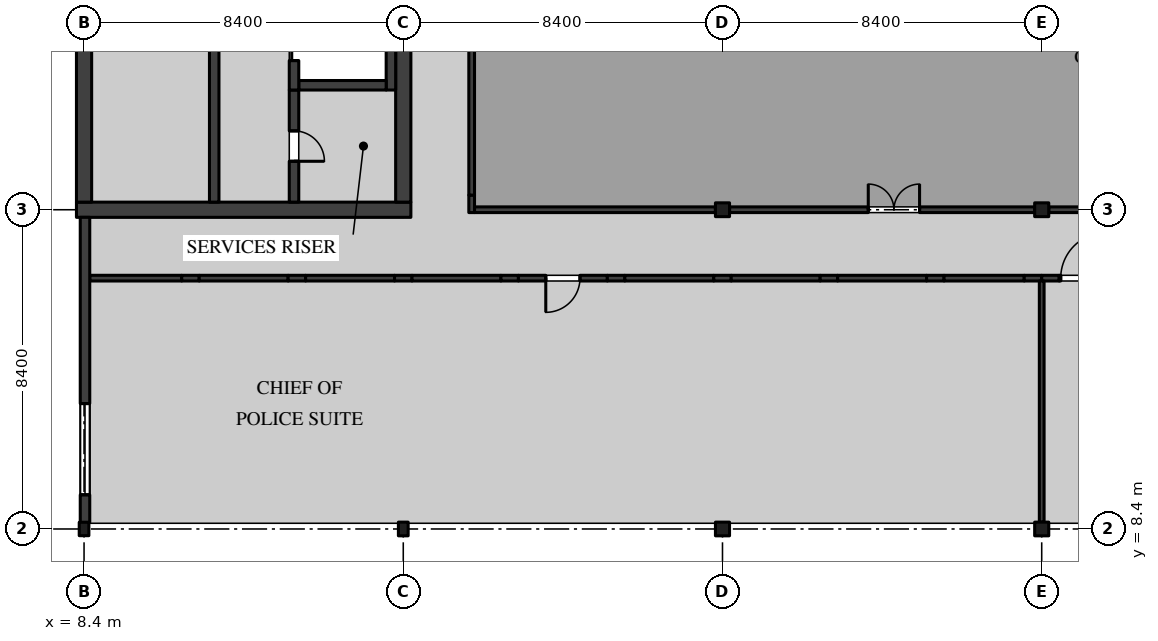
"""IFC4 building model, lengths in metres.
Left out: names, types, materials, properties, quantities, classifications, styles, units other than length and angle.
Written with IfcOpenShell. Run it as: python <this file> out.ifc"""

import sys

from ifc_helpers import new_model, si_unit, direction, frame, frame_2d, origin, origin_2d, place, context, subcontext, project, spatial, rectangle, i_section, extrude, element, fill, save


model = new_model("IFC4")
c1 = context("Model", 3, precision=1e-05, world=origin(), true_north=direction((0.0, 1.0)))
c2 = subcontext(c1, "Body", "Model", "MODEL_VIEW")
j1 = project(units=[si_unit("LENGTHUNIT", "METRE"), si_unit("PLANEANGLEUNIT", "RADIAN")], contexts=[c1])
p1 = place(None, origin())
s1 = spatial("IfcSite", under=j1, at=p1, CompositionType="ELEMENT")
p2 = place(p1, origin())
s2 = spatial("IfcBuilding", under=s1, at=p2, CompositionType="ELEMENT")
p3 = place(p2, frame((0.0, 0.0, 9.9)))
s3 = spatial("IfcBuildingStorey", under=s2, at=p3, CompositionType="ELEMENT", Elevation=9.9)
p4 = place(p3, frame((8.4, 8.4, 0.0), z_axis=(0.0, 0.0, 1.0), x_axis=(1.0, 0.0, 0.0)))
e1 = element("IfcColumn", 1, at=p4, inside=s3, PredefinedType="COLUMN", context=c2, shape_type="SweptSolid", body=[
    extrude(i_section(OverallWidth=0.254, OverallDepth=0.353, WebThickness=0.01, FlangeThickness=0.016, FilletRadius=0.015, at=origin_2d()), origin(), (0.0, 0.0, 1.0), 4.37),
])
p5 = place(p3, frame((16.8, 8.4, 0.0), z_axis=(0.0, 0.0, 1.0), x_axis=(1.0, 0.0, 0.0)))
e2 = element("IfcColumn", 2, at=p5, inside=s3, PredefinedType="COLUMN", context=c2, shape_type="SweptSolid", body=[
    extrude(i_section(OverallWidth=0.257, OverallDepth=0.361, WebThickness=0.011, FlangeThickness=0.02, FilletRadius=0.015, at=origin_2d()), origin(), (0.0, 0.0, 1.0), 4.37),
])
p6 = place(p3, frame((25.2, 8.4, 0.0), z_axis=(0.0, 0.0, 1.0), x_axis=(1.0, 0.0, 0.0)))
e3 = element("IfcColumn", 3, at=p6, inside=s3, PredefinedType="COLUMN", context=c2, shape_type="SweptSolid", body=[
    extrude(i_section(OverallWidth=0.371, OverallDepth=0.361, WebThickness=0.012, FlangeThickness=0.02, FilletRadius=0.015, at=origin_2d()), origin(), (0.0, 0.0, 1.0), 4.37),
])
p7 = place(p3, frame((25.2, 16.8, 0.0), z_axis=(0.0, 0.0, 1.0), x_axis=(1.0, 0.0, 0.0)))
e4 = element("IfcColumn", 4, at=p7, inside=s3, PredefinedType="COLUMN", context=c2, shape_type="SweptSolid", body=[
    extrude(i_section(OverallWidth=0.371, OverallDepth=0.363, WebThickness=0.013, FlangeThickness=0.022, FilletRadius=0.015, at=origin_2d()), origin(), (0.0, 0.0, 1.0), 4.37),
])
p8 = place(p3, frame((33.6, 8.4, 0.0), z_axis=(0.0, 0.0, 1.0), x_axis=(1.0, 0.0, 0.0)))
e5 = element("IfcColumn", 5, at=p8, inside=s3, PredefinedType="COLUMN", context=c2, shape_type="SweptSolid", body=[
    extrude(i_section(OverallWidth=0.371, OverallDepth=0.361, WebThickness=0.012, FlangeThickness=0.02, FilletRadius=0.015, at=origin_2d()), origin(), (0.0, 0.0, 1.0), 4.37),
])
p9 = place(p3, frame((33.6, 16.8, 0.0), z_axis=(0.0, 0.0, 1.0), x_axis=(1.0, 0.0, 0.0)))
e6 = element("IfcColumn", 6, at=p9, inside=s3, PredefinedType="COLUMN", context=c2, shape_type="SweptSolid", body=[
    extrude(i_section(OverallWidth=0.371, OverallDepth=0.363, WebThickness=0.013, FlangeThickness=0.022, FilletRadius=0.015, at=origin_2d()), origin(), (0.0, 0.0, 1.0), 4.37),
])
p10 = place(p3, frame((8.2, 16.8, 0.0), z_axis=(0.0, 0.0, 1.0), x_axis=(1.0, 0.0, 0.0)))
e7 = element("IfcWall", 7, at=p10, inside=s3, PredefinedType="SHEAR", context=c2, shape_type="SweptSolid", body=[
    extrude(rectangle(XDim=8.8, YDim=0.4, at=frame_2d((4.4, 0.0))), origin(), (0.0, 0.0, 1.0), 4.37),
])
p11 = place(p3, frame((8.4, 17.0, 0.0), z_axis=(0.0, 0.0, 1.0), x_axis=(0.0, 1.0, 0.0)))
e8 = element("IfcWall", 8, at=p11, inside=s3, PredefinedType="SHEAR", context=c2, shape_type="SweptSolid", body=[
    extrude(rectangle(XDim=8.0, YDim=0.4, at=frame_2d((4.0, 0.0))), origin(), (0.0, 0.0, 1.0), 4.37),
])
p12 = place(p3, frame((16.8, 17.0, 0.0), z_axis=(0.0, 0.0, 1.0), x_axis=(0.0, 1.0, 0.0)))
e9 = element("IfcWall", 9, at=p12, inside=s3, PredefinedType="SHEAR", context=c2, shape_type="SweptSolid", body=[
    extrude(rectangle(XDim=8.0, YDim=0.4, at=frame_2d((4.0, 0.0))), origin(), (0.0, 0.0, 1.0), 4.37),
])
p13 = place(p12, frame((6.2, 0.0, 0.0)))
e10 = element("IfcOpeningElement", 10, at=p13, cuts=e9, PredefinedType="OPENING", context=c2, shape_type="SweptSolid", body=[
    extrude(rectangle(XDim=1.2, YDim=2.1, at=frame_2d((0.6, 1.05))), frame((0.0, 0.21, 0.0), z_axis=(0.0, -1.0, 0.0), x_axis=(1.0, 0.0, 0.0)), (0.0, 0.0, 1.0), 0.42),
])
p14 = place(p3, frame((11.825, 25.0, 0.0), z_axis=(0.0, 0.0, 1.0), x_axis=(0.0, -1.0, 0.0)))
e11 = element("IfcWall", 11, at=p14, inside=s3, PredefinedType="SOLIDWALL", context=c2, shape_type="SweptSolid", body=[
    extrude(rectangle(XDim=8.0, YDim=0.25, at=frame_2d((4.0, 0.0))), origin(), (0.0, 0.0, 1.0), 4.37),
])
p15 = place(p14, frame((0.2, 0.0, 0.0)))
e12 = element("IfcOpeningElement", 12, at=p15, cuts=e11, PredefinedType="OPENING", context=c2, shape_type="SweptSolid", body=[
    extrude(rectangle(XDim=1.1, YDim=2.1, at=frame_2d((0.55, 1.05))), frame((0.0, 0.135, 0.0), z_axis=(0.0, -1.0, 0.0), x_axis=(1.0, 0.0, 0.0)), (0.0, 0.0, 1.0), 0.27),
])
p16 = place(p3, frame((13.925, 19.95, 0.0), z_axis=(0.0, 0.0, 1.0), x_axis=(0.0, -1.0, 0.0)))
e13 = element("IfcWall", 13, at=p16, inside=s3, PredefinedType="SOLIDWALL", context=c2, shape_type="SweptSolid", body=[
    extrude(rectangle(XDim=2.95, YDim=0.25, at=frame_2d((1.475, 0.0))), origin(), (0.0, 0.0, 1.0), 4.37),
])
p17 = place(p16, frame((1.075, 0.0, 0.0)))
e14 = element("IfcOpeningElement", 14, at=p17, cuts=e13, PredefinedType="OPENING", context=c2, shape_type="SweptSolid", body=[
    extrude(rectangle(XDim=0.8, YDim=2.1, at=frame_2d((0.4, 1.05))), frame((0.0, 0.135, 0.0), z_axis=(0.0, -1.0, 0.0), x_axis=(1.0, 0.0, 0.0)), (0.0, 0.0, 1.0), 0.27),
])
p18 = place(p3, frame((16.475, 19.95, 0.0), z_axis=(0.0, 0.0, 1.0), x_axis=(0.0, 1.0, 0.0)))
e15 = element("IfcWall", 15, at=p18, inside=s3, PredefinedType="SOLIDWALL", context=c2, shape_type="SweptSolid", body=[
    extrude(rectangle(XDim=2.65, YDim=0.25, at=frame_2d((1.325, 0.0))), origin(), (0.0, 0.0, 1.0), 4.37),
])
p19 = place(p3, frame((14.05, 20.075, 0.0), z_axis=(0.0, 0.0, 1.0), x_axis=(1.0, 0.0, 0.0)))
e16 = element("IfcWall", 16, at=p19, inside=s3, PredefinedType="SOLIDWALL", context=c2, shape_type="SweptSolid", body=[
    extrude(rectangle(XDim=2.3, YDim=0.25, at=frame_2d((1.15, 0.0))), origin(), (0.0, 0.0, 1.0), 4.37),
])
p20 = place(p3, frame((13.925, 19.95, 0.0), z_axis=(0.0, 0.0, 1.0), x_axis=(0.0, 1.0, 0.0)))
e17 = element("IfcWall", 17, at=p20, inside=s3, PredefinedType="SOLIDWALL", context=c2, shape_type="SweptSolid", body=[
    extrude(rectangle(XDim=2.65, YDim=0.25, at=frame_2d((1.325, 0.0))), origin(), (0.0, 0.0, 1.0), 4.37),
])
p21 = place(p20, frame((0.775, 0.0, 0.0)))
e18 = element("IfcOpeningElement", 18, at=p21, cuts=e17, PredefinedType="OPENING", context=c2, shape_type="SweptSolid", body=[
    extrude(rectangle(XDim=1.1, YDim=2.1, at=frame_2d((0.55, 1.05))), frame((0.0, 0.135, 0.0), z_axis=(0.0, -1.0, 0.0), x_axis=(1.0, 0.0, 0.0)), (0.0, 0.0, 1.0), 0.27),
])
p22 = place(p3, frame((18.6, 16.725, 0.0), z_axis=(0.0, 0.0, 1.0), x_axis=(0.0, 1.0, 0.0)))
e19 = element("IfcWall", 19, at=p22, inside=s3, PredefinedType="PARTITIONING", context=c2, shape_type="SweptSolid", body=[
    extrude(rectangle(XDim=0.46, YDim=0.15, at=frame_2d((0.23, 0.0))), origin(), (0.0, 0.0, 1.0), 3.746),
])
p23 = place(p3, frame((18.6, 17.185, 0.0), z_axis=(0.0, 0.0, 1.0), x_axis=(0.0, 1.0, 0.0)))
e20 = element("IfcWall", 20, at=p23, inside=s3, PredefinedType="PARTITIONING", context=c2, shape_type="SweptSolid", body=[
    extrude(rectangle(XDim=7.63, YDim=0.15, at=frame_2d((3.815, 0.0))), origin(), (0.0, 0.0, 1.0), 4.37),
])
p24 = place(p3, frame((18.675, 16.8, 0.0), z_axis=(0.0, 0.0, 1.0), x_axis=(1.0, 0.0, 0.0)))
e21 = element("IfcWall", 21, at=p24, inside=s3, PredefinedType="PARTITIONING", context=c2, shape_type="SweptSolid", body=[
    extrude(rectangle(XDim=6.339, YDim=0.15, at=frame_2d((3.169, 0.0))), origin(), (0.0, 0.0, 1.0), 3.746),
])
p25 = place(p3, frame((25.386, 16.8, 0.0), z_axis=(0.0, 0.0, 1.0), x_axis=(1.0, 0.0, 0.0)))
e22 = element("IfcWall", 22, at=p25, inside=s3, PredefinedType="PARTITIONING", context=c2, shape_type="SweptSolid", body=[
    extrude(rectangle(XDim=8.029, YDim=0.15, at=frame_2d((4.015, 0.0))), origin(), (0.0, 0.0, 1.0), 3.746),
])
p26 = place(p25, frame((3.65, 0.0, 0.0)))
e23 = element("IfcOpeningElement", 23, at=p26, cuts=e22, PredefinedType="OPENING", context=c2, shape_type="SweptSolid", body=[
    extrude(rectangle(XDim=1.35, YDim=2.1, at=frame_2d((0.675, 1.05))), frame((0.0, 0.085, 0.0), z_axis=(0.0, -1.0, 0.0), x_axis=(1.0, 0.0, 0.0)), (0.0, 0.0, 1.0), 0.17),
])
p27 = place(p3, frame((33.785, 16.8, 0.0), z_axis=(0.0, 0.0, 1.0), x_axis=(1.0, 0.0, 0.0)))
e24 = element("IfcWall", 24, at=p27, inside=s3, PredefinedType="PARTITIONING", context=c2, shape_type="SweptSolid", body=[
    extrude(rectangle(XDim=6.415, YDim=0.15, at=frame_2d((3.208, 0.0))), origin(), (0.0, 0.0, 1.0), 3.746),
])
p28 = place(p3, frame((8.55, 15.0, 0.0), z_axis=(0.0, 0.0, 1.0), x_axis=(1.0, 0.0, 0.0)))
e25 = element("IfcWall", 25, at=p28, inside=s3, PredefinedType="PARTITIONING", context=c2, shape_type="SweptSolid", body=[
    extrude(rectangle(XDim=2.42, YDim=0.15, at=frame_2d((1.21, 0.0))), origin(), (0.0, 0.0, 1.0), 4.37),
])
p29 = place(p3, frame((10.97, 15.0, 0.0), z_axis=(0.0, 0.0, 1.0), x_axis=(1.0, 0.0, 0.0)))
e26 = element("IfcWall", 26, at=p29, inside=s3, PredefinedType="PARTITIONING", context=c2, shape_type="SweptSolid", body=[
    extrude(rectangle(XDim=0.46, YDim=0.15, at=frame_2d((0.23, 0.0))), origin(), (0.0, 0.0, 1.0), 3.895),
])
p30 = place(p3, frame((11.43, 15.0, 0.0), z_axis=(0.0, 0.0, 1.0), x_axis=(1.0, 0.0, 0.0)))
e27 = element("IfcWall", 27, at=p30, inside=s3, PredefinedType="PARTITIONING", context=c2, shape_type="SweptSolid", body=[
    extrude(rectangle(XDim=2.34, YDim=0.15, at=frame_2d((1.17, 0.0))), origin(), (0.0, 0.0, 1.0), 4.37),
])
p31 = place(p3, frame((13.77, 15.0, 0.0), z_axis=(0.0, 0.0, 1.0), x_axis=(1.0, 0.0, 0.0)))
e28 = element("IfcWall", 28, at=p31, inside=s3, PredefinedType="PARTITIONING", context=c2, shape_type="SweptSolid", body=[
    extrude(rectangle(XDim=0.46, YDim=0.15, at=frame_2d((0.23, 0.0))), origin(), (0.0, 0.0, 1.0), 3.895),
])
p32 = place(p3, frame((14.23, 15.0, 0.0), z_axis=(0.0, 0.0, 1.0), x_axis=(1.0, 0.0, 0.0)))
e29 = element("IfcWall", 29, at=p32, inside=s3, PredefinedType="PARTITIONING", context=c2, shape_type="SweptSolid", body=[
    extrude(rectangle(XDim=2.34, YDim=0.15, at=frame_2d((1.17, 0.0))), origin(), (0.0, 0.0, 1.0), 4.37),
])
p33 = place(p3, frame((16.57, 15.0, 0.0), z_axis=(0.0, 0.0, 1.0), x_axis=(1.0, 0.0, 0.0)))
e30 = element("IfcWall", 30, at=p33, inside=s3, PredefinedType="PARTITIONING", context=c2, shape_type="SweptSolid", body=[
    extrude(rectangle(XDim=0.46, YDim=0.15, at=frame_2d((0.23, 0.0))), origin(), (0.0, 0.0, 1.0), 3.746),
])
p34 = place(p3, frame((17.03, 15.0, 0.0), z_axis=(0.0, 0.0, 1.0), x_axis=(1.0, 0.0, 0.0)))
e31 = element("IfcWall", 31, at=p34, inside=s3, PredefinedType="PARTITIONING", context=c2, shape_type="SweptSolid", body=[
    extrude(rectangle(XDim=2.34, YDim=0.15, at=frame_2d((1.17, 0.0))), origin(), (0.0, 0.0, 1.0), 4.37),
])
p35 = place(p3, frame((19.37, 15.0, 0.0), z_axis=(0.0, 0.0, 1.0), x_axis=(1.0, 0.0, 0.0)))
e32 = element("IfcWall", 32, at=p35, inside=s3, PredefinedType="PARTITIONING", context=c2, shape_type="SweptSolid", body=[
    extrude(rectangle(XDim=0.46, YDim=0.15, at=frame_2d((0.23, 0.0))), origin(), (0.0, 0.0, 1.0), 3.895),
])
p36 = place(p3, frame((19.83, 15.0, 0.0), z_axis=(0.0, 0.0, 1.0), x_axis=(1.0, 0.0, 0.0)))
e33 = element("IfcWall", 33, at=p36, inside=s3, PredefinedType="PARTITIONING", context=c2, shape_type="SweptSolid", body=[
    extrude(rectangle(XDim=2.34, YDim=0.15, at=frame_2d((1.17, 0.0))), origin(), (0.0, 0.0, 1.0), 4.37),
])
p37 = place(p36, frame((0.72, 0.0, 0.0)))
e34 = element("IfcOpeningElement", 34, at=p37, cuts=e33, PredefinedType="OPENING", context=c2, shape_type="SweptSolid", body=[
    extrude(rectangle(XDim=0.9, YDim=2.1, at=frame_2d((0.45, 1.05))), frame((0.0, 0.085, 0.0), z_axis=(0.0, -1.0, 0.0), x_axis=(1.0, 0.0, 0.0)), (0.0, 0.0, 1.0), 0.17),
])
p38 = place(p3, frame((22.17, 15.0, 0.0), z_axis=(0.0, 0.0, 1.0), x_axis=(1.0, 0.0, 0.0)))
e35 = element("IfcWall", 35, at=p38, inside=s3, PredefinedType="PARTITIONING", context=c2, shape_type="SweptSolid", body=[
    extrude(rectangle(XDim=0.46, YDim=0.15, at=frame_2d((0.23, 0.0))), origin(), (0.0, 0.0, 1.0), 3.895),
])
p39 = place(p3, frame((22.63, 15.0, 0.0), z_axis=(0.0, 0.0, 1.0), x_axis=(1.0, 0.0, 0.0)))
e36 = element("IfcWall", 36, at=p39, inside=s3, PredefinedType="PARTITIONING", context=c2, shape_type="SweptSolid", body=[
    extrude(rectangle(XDim=2.34, YDim=0.15, at=frame_2d((1.17, 0.0))), origin(), (0.0, 0.0, 1.0), 4.37),
])
p40 = place(p3, frame((24.97, 15.0, 0.0), z_axis=(0.0, 0.0, 1.0), x_axis=(1.0, 0.0, 0.0)))
e37 = element("IfcWall", 37, at=p40, inside=s3, PredefinedType="PARTITIONING", context=c2, shape_type="SweptSolid", body=[
    extrude(rectangle(XDim=0.46, YDim=0.15, at=frame_2d((0.23, 0.0))), origin(), (0.0, 0.0, 1.0), 3.746),
])
p41 = place(p3, frame((25.43, 15.0, 0.0), z_axis=(0.0, 0.0, 1.0), x_axis=(1.0, 0.0, 0.0)))
e38 = element("IfcWall", 38, at=p41, inside=s3, PredefinedType="PARTITIONING", context=c2, shape_type="SweptSolid", body=[
    extrude(rectangle(XDim=2.34, YDim=0.15, at=frame_2d((1.17, 0.0))), origin(), (0.0, 0.0, 1.0), 4.37),
])
p42 = place(p3, frame((27.77, 15.0, 0.0), z_axis=(0.0, 0.0, 1.0), x_axis=(1.0, 0.0, 0.0)))
e39 = element("IfcWall", 39, at=p42, inside=s3, PredefinedType="PARTITIONING", context=c2, shape_type="SweptSolid", body=[
    extrude(rectangle(XDim=0.46, YDim=0.15, at=frame_2d((0.23, 0.0))), origin(), (0.0, 0.0, 1.0), 3.895),
])
p43 = place(p3, frame((28.23, 15.0, 0.0), z_axis=(0.0, 0.0, 1.0), x_axis=(1.0, 0.0, 0.0)))
e40 = element("IfcWall", 40, at=p43, inside=s3, PredefinedType="PARTITIONING", context=c2, shape_type="SweptSolid", body=[
    extrude(rectangle(XDim=2.34, YDim=0.15, at=frame_2d((1.17, 0.0))), origin(), (0.0, 0.0, 1.0), 4.37),
])
p44 = place(p3, frame((30.57, 15.0, 0.0), z_axis=(0.0, 0.0, 1.0), x_axis=(1.0, 0.0, 0.0)))
e41 = element("IfcWall", 41, at=p44, inside=s3, PredefinedType="PARTITIONING", context=c2, shape_type="SweptSolid", body=[
    extrude(rectangle(XDim=0.46, YDim=0.15, at=frame_2d((0.23, 0.0))), origin(), (0.0, 0.0, 1.0), 3.895),
])
p45 = place(p3, frame((31.03, 15.0, 0.0), z_axis=(0.0, 0.0, 1.0), x_axis=(1.0, 0.0, 0.0)))
e42 = element("IfcWall", 42, at=p45, inside=s3, PredefinedType="PARTITIONING", context=c2, shape_type="SweptSolid", body=[
    extrude(rectangle(XDim=2.11, YDim=0.15, at=frame_2d((1.055, 0.0))), origin(), (0.0, 0.0, 1.0), 4.37),
])
p46 = place(p3, frame((33.14, 15.0, 0.0), z_axis=(0.0, 0.0, 1.0), x_axis=(1.0, 0.0, 0.0)))
e43 = element("IfcWall", 43, at=p46, inside=s3, PredefinedType="PARTITIONING", context=c2, shape_type="SweptSolid", body=[
    extrude(rectangle(XDim=0.46, YDim=0.15, at=frame_2d((0.23, 0.0))), origin(), (0.0, 0.0, 1.0), 3.746),
])
p47 = place(p3, frame((33.6, 15.0, 0.0), z_axis=(0.0, 0.0, 1.0), x_axis=(1.0, 0.0, 0.0)))
e44 = element("IfcWall", 44, at=p47, inside=s3, PredefinedType="PARTITIONING", context=c2, shape_type="SweptSolid", body=[
    extrude(rectangle(XDim=0.46, YDim=0.15, at=frame_2d((0.23, 0.0))), origin(), (0.0, 0.0, 1.0), 3.746),
])
p48 = place(p3, frame((34.06, 15.0, 0.0), z_axis=(0.0, 0.0, 1.0), x_axis=(1.0, 0.0, 0.0)))
e45 = element("IfcWall", 45, at=p48, inside=s3, PredefinedType="PARTITIONING", context=c2, shape_type="SweptSolid", body=[
    extrude(rectangle(XDim=2.11, YDim=0.15, at=frame_2d((1.055, 0.0))), origin(), (0.0, 0.0, 1.0), 4.37),
])
p49 = place(p48, frame((0.04, 0.0, 0.0)))
e46 = element("IfcOpeningElement", 46, at=p49, cuts=e45, PredefinedType="OPENING", context=c2, shape_type="SweptSolid", body=[
    extrude(rectangle(XDim=1.2, YDim=2.4, at=frame_2d((0.6, 1.2))), frame((0.0, 0.085, 0.0), z_axis=(0.0, -1.0, 0.0), x_axis=(1.0, 0.0, 0.0)), (0.0, 0.0, 1.0), 0.17),
])
p50 = place(p3, frame((33.6, 8.581, 0.0), z_axis=(0.0, 0.0, 1.0), x_axis=(0.0, 1.0, 0.0)))
e47 = element("IfcWall", 47, at=p50, inside=s3, PredefinedType="PARTITIONING", context=c2, shape_type="SweptSolid", body=[
    extrude(rectangle(XDim=6.344, YDim=0.125, at=frame_2d((3.172, 0.0))), origin(), (0.0, 0.0, 1.0), 3.746),
])
p51 = place(p3, frame((8.425, 16.6, 0.0), z_axis=(0.0, 0.0, 1.0), x_axis=(0.0, -1.0, 0.0)))
e48 = element("IfcWall", 48, at=p51, inside=s3, PredefinedType="SOLIDWALL", context=c2, shape_type="SweptSolid", body=[
    extrude(rectangle(XDim=8.03, YDim=0.25, at=frame_2d((4.015, 0.0))), origin(), (0.0, 0.0, 1.0), 3.746),
])
p52 = place(p51, frame((4.9, 0.0, 0.6)))
e49 = element("IfcOpeningElement", 49, at=p52, cuts=e48, PredefinedType="OPENING", context=c2, shape_type="SweptSolid", body=[
    extrude(rectangle(XDim=2.4, YDim=2.55, at=frame_2d((1.2, 1.275))), frame((0.0, 0.135, 0.0), z_axis=(0.0, -1.0, 0.0), x_axis=(1.0, 0.0, 0.0)), (0.0, 0.0, 1.0), 0.27),
])
p53 = place(p17, origin())
e50 = element("IfcDoor", 50, at=p53, inside=s3, OperationType="SINGLE_SWING_LEFT", PredefinedType="DOOR", context=c2, shape_type="SweptSolid", body=[
    extrude(rectangle(XDim=0.8, YDim=2.1, at=frame_2d((0.4, 1.05))), frame((0.0, 0.035, 0.0), z_axis=(0.0, -1.0, 0.0), x_axis=(1.0, 0.0, 0.0)), (0.0, 0.0, 1.0), 0.07),
])
fill(e14, e50)
p54 = place(p21, origin())
e51 = element("IfcDoor", 51, at=p54, inside=s3, OperationType="DOUBLE_DOOR_SLIDING", PredefinedType="DOOR", context=c2, shape_type="SweptSolid", body=[
    extrude(rectangle(XDim=1.1, YDim=2.1, at=frame_2d((0.55, 1.05))), frame((0.0, 0.04, 0.0), z_axis=(0.0, -1.0, 0.0), x_axis=(1.0, 0.0, 0.0)), (0.0, 0.0, 1.0), 0.08),
])
fill(e18, e51)
p55 = place(p26, origin())
e52 = element("IfcDoor", 52, at=p55, inside=s3, OperationType="DOUBLE_DOOR_SINGLE_SWING", PredefinedType="DOOR", context=c2, shape_type="SweptSolid", body=[
    extrude(rectangle(XDim=1.35, YDim=2.1, at=frame_2d((0.675, 1.05))), frame((0.0, 0.025, 0.0), z_axis=(0.0, -1.0, 0.0), x_axis=(1.0, 0.0, 0.0)), (0.0, 0.0, 1.0), 0.05),
])
fill(e23, e52)
p56 = place(p37, frame((0.9, 0.0, 0.0), z_axis=(0.0, 0.0, 1.0), x_axis=(-1.0, 0.0, 0.0)))
e53 = element("IfcDoor", 53, at=p56, inside=s3, OperationType="SINGLE_SWING_LEFT", PredefinedType="DOOR", context=c2, shape_type="SweptSolid", body=[
    extrude(rectangle(XDim=0.9, YDim=2.1, at=frame_2d((0.45, 1.05))), frame((0.0, 0.025, 0.0), z_axis=(0.0, -1.0, 0.0), x_axis=(1.0, 0.0, 0.0)), (0.0, 0.0, 1.0), 0.05),
])
fill(e34, e53)
p57 = place(p49, origin())
e54 = element("IfcDoor", 54, at=p57, inside=s3, OperationType="SINGLE_SWING_LEFT", PredefinedType="DOOR", context=c2, shape_type="SweptSolid", body=[
    extrude(rectangle(XDim=1.2, YDim=2.4, at=frame_2d((0.6, 1.2))), frame((0.0, 0.025, 0.0), z_axis=(0.0, -1.0, 0.0), x_axis=(1.0, 0.0, 0.0)), (0.0, 0.0, 1.0), 0.05),
])
fill(e46, e54)
p58 = place(p52, origin())
e55 = element("IfcWindow", 55, at=p58, inside=s3, PartitioningType="SINGLE_PANEL", PredefinedType="WINDOW", context=c2, shape_type="SweptSolid", body=[
    extrude(rectangle(XDim=2.4, YDim=2.55, at=frame_2d((1.2, 1.275))), frame((0.0, 0.04, 0.0), z_axis=(0.0, -1.0, 0.0), x_axis=(1.0, 0.0, 0.0)), (0.0, 0.0, 1.0), 0.08),
])
fill(e49, e55)
save(model, sys.argv[1])
